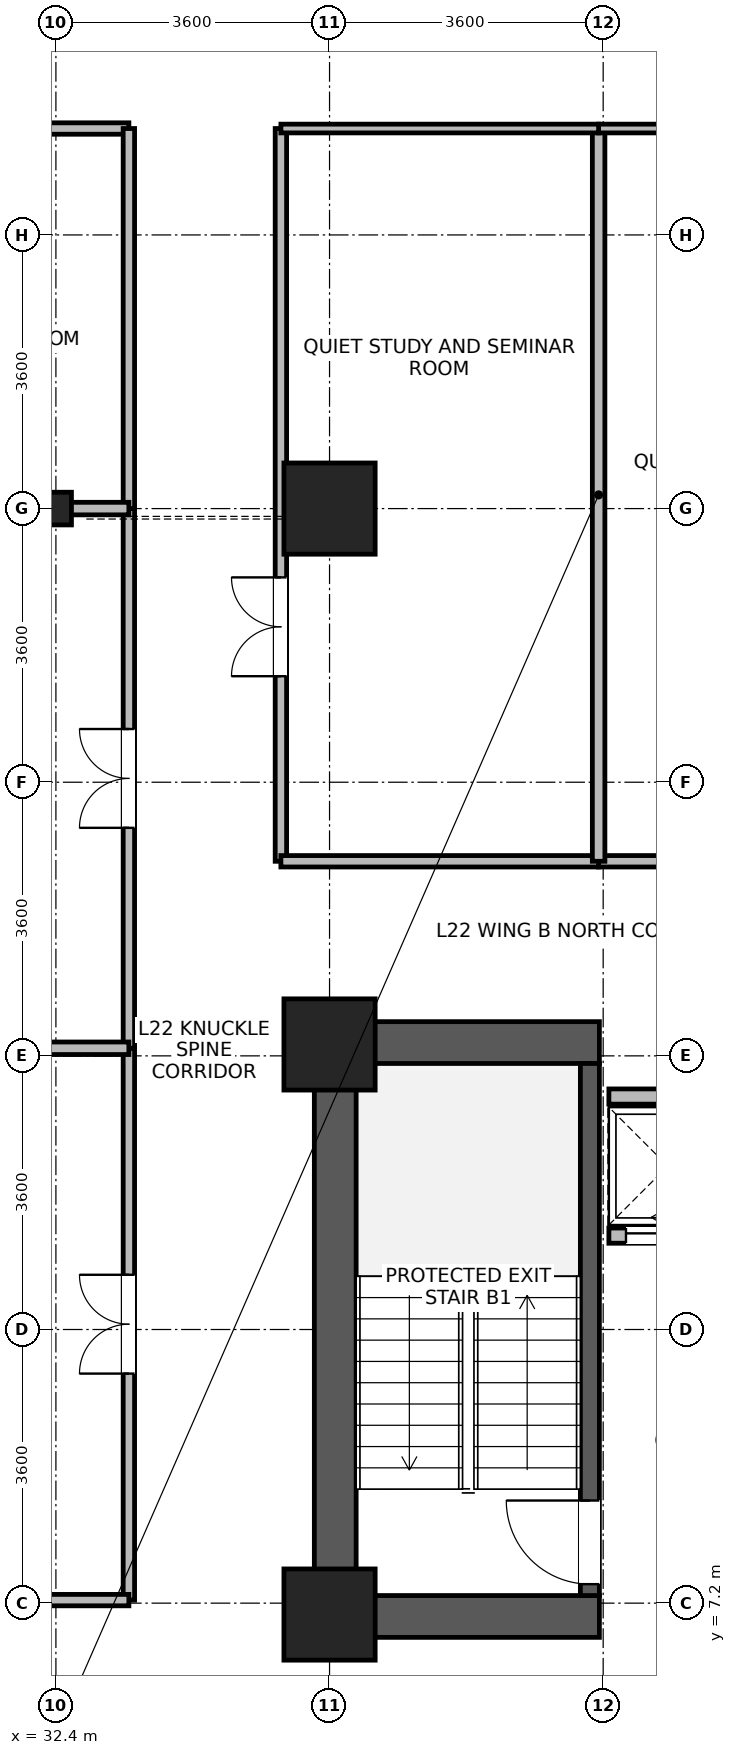
"""IFC4 building model, lengths in metres.
Left out: names, types, materials, properties, quantities, classifications, styles, units other than length and angle.
Written with IfcOpenShell. Run it as: python <this file> out.ifc"""

import sys

from ifc_helpers import new_model, si_unit, direction, frame, frame_2d, origin, origin_2d, place, context, subcontext, project, spatial, rectangle, i_section, extrude, source, transform, mapped, element, fill, save


model = new_model("IFC4")
c1 = context("Model", 3, precision=1e-05, world=origin(), true_north=direction((0.0, 1.0)))
c2 = subcontext(c1, "Body", "Model", "MODEL_VIEW")
j1 = project(units=[si_unit("LENGTHUNIT", "METRE"), si_unit("PLANEANGLEUNIT", "RADIAN")], contexts=[c1])
p1 = place(None, origin())
s1 = spatial("IfcSite", under=j1, at=p1, CompositionType="ELEMENT")
p2 = place(p1, origin())
s2 = spatial("IfcBuilding", under=s1, at=p2, CompositionType="ELEMENT")
p3 = place(p2, frame((0.0, 0.0, 89.7)))
s3 = spatial("IfcBuildingStorey", under=s2, at=p3, CompositionType="ELEMENT", Elevation=89.7)
p4 = place(p3, frame((36.075, 6.75, 0.0), z_axis=(0.0, 0.0, 1.0), x_axis=(0.0, 1.0, 0.0)))
e1 = element("IfcWall", 1, at=p4, inside=s3, PredefinedType="SHEAR", context=c2, shape_type="SweptSolid", body=[
    extrude(rectangle(XDim=8.1, YDim=0.55, at=frame_2d((4.05, 0.0))), origin(), (0.0, 0.0, 1.0), 3.45),
])
for number, where, z_axis, x_axis in (
    (2, (36.35, 7.025, 0.0), (0.0, 0.0, 1.0), (1.0, 0.0, 0.0)),
    (3, (36.35, 14.575, 0.0), (0.0, 0.0, 1.0), (1.0, 0.0, 0.0)),
):
    element("IfcWall", number, at=place(p3, frame(where, z_axis=z_axis, x_axis=x_axis)), inside=s3, PredefinedType="SHEAR", context=c2, shape_type="SweptSolid", body=[
        extrude(rectangle(XDim=3.2, YDim=0.55, at=frame_2d((1.6, 0.0))), origin(), (0.0, 0.0, 1.0), 3.45),
    ])
p5 = place(p3, frame((39.425, 7.3, 0.0), z_axis=(0.0, 0.0, 1.0), x_axis=(0.0, 1.0, 0.0)))
e4 = element("IfcWall", 4, at=p5, inside=s3, PredefinedType="SHEAR", context=c2, shape_type="SweptSolid", body=[
    extrude(rectangle(XDim=7.0, YDim=0.25, at=frame_2d((3.5, 0.0))), origin(), (0.0, 0.0, 1.0), 3.45),
])
p6 = place(p5, frame((0.15, 0.0, 0.0)))
e5 = element("IfcOpeningElement", 5, at=p6, cuts=e4, PredefinedType="OPENING", context=c2, shape_type="SweptSolid", body=[
    extrude(rectangle(XDim=1.1, YDim=2.08, at=frame_2d((0.55, 1.04))), frame((0.0, 0.135, 0.0), z_axis=(0.0, -1.0, 0.0), x_axis=(1.0, 0.0, 0.0)), (0.0, 0.0, 1.0), 0.27),
])
m1 = source(origin(), c2, "Body", "SweptSolid", [
    extrude(rectangle(XDim=1.2, YDim=1.2, at=origin_2d()), origin(), (0.0, 0.0, 1.0), 3.7),
])
for number, where, z_axis, x_axis in (
    (6, (36.0, 21.6, 0.0), (0.0, 0.0, 1.0), (1.0, 0.0, 0.0)),
    (7, (36.0, 7.05, 0.0), (0.0, 0.0, 1.0), (1.0, 0.0, 0.0)),
    (8, (36.0, 14.55, 0.0), (0.0, 0.0, 1.0), (1.0, 0.0, 0.0)),
):
    element("IfcColumn", number, at=place(p3, frame(where, z_axis=z_axis, x_axis=x_axis)), inside=s3, PredefinedType="COLUMN", context=c2, shape_type="MappedRepresentation", body=[
        mapped(m1, transform((0.0, 0.0, 0.0), x_axis=(1.0, 0.0, 0.0), y_axis=(0.0, 1.0, 0.0), z_axis=(0.0, 0.0, 1.0), scale=1.0)),
    ])
m2 = source(origin(), c2, "Body", "SweptSolid", [
    extrude(i_section(OverallWidth=0.409, OverallDepth=0.43, WebThickness=0.024, FlangeThickness=0.033, FilletRadius=0.015, at=origin_2d()), origin(), (0.0, 0.0, 1.0), 3.7),
])
p7 = place(p3, frame((32.4, 21.6, 0.0), z_axis=(0.0, 0.0, 1.0), x_axis=(1.0, 0.0, 0.0)))
e9 = element("IfcColumn", 9, at=p7, inside=s3, PredefinedType="COLUMN", context=c2, shape_type="MappedRepresentation", body=[
    mapped(m2, transform((0.0, 0.0, 0.0), x_axis=(1.0, 0.0, 0.0), y_axis=(0.0, 1.0, 0.0), z_axis=(0.0, 0.0, 1.0), scale=1.0)),
])
p8 = place(p3, frame((39.675, 12.035, 0.0), z_axis=(0.0, 0.0, 1.0), x_axis=(1.0, 0.0, 0.0)))
e10 = element("IfcWall", 10, at=p8, inside=s3, PredefinedType="PARTITIONING", context=c2, shape_type="SweptSolid", body=[
    extrude(rectangle(XDim=1.55, YDim=0.2, at=frame_2d((0.775, 0.0))), origin(), (0.0, 0.0, 1.0), 3.43),
])
p9 = place(p8, frame((0.225, 0.0, 0.0)))
e11 = element("IfcOpeningElement", 11, at=p9, cuts=e10, PredefinedType="OPENING", context=c2, shape_type="SweptSolid", body=[
    extrude(rectangle(XDim=1.1, YDim=2.12, at=frame_2d((0.55, 1.06))), frame((0.0, 0.11, 0.0), z_axis=(0.0, -1.0, 0.0), x_axis=(1.0, 0.0, 0.0)), (0.0, 0.0, 1.0), 0.22),
])
p10 = place(p3, frame((39.675, 13.865, 0.0), z_axis=(0.0, 0.0, 1.0), x_axis=(1.0, 0.0, 0.0)))
e12 = element("IfcWall", 12, at=p10, inside=s3, PredefinedType="PARTITIONING", context=c2, shape_type="SweptSolid", body=[
    extrude(rectangle(XDim=1.55, YDim=0.2, at=frame_2d((0.775, 0.0))), origin(), (0.0, 0.0, 1.0), 3.43),
])
p11 = place(p3, frame((35.36, 16.96, 0.0), z_axis=(0.0, 0.0, 1.0), x_axis=(0.0, 1.0, 0.0)))
e13 = element("IfcWall", 13, at=p11, inside=s3, PredefinedType="PARTITIONING", context=c2, shape_type="SweptSolid", body=[
    extrude(rectangle(XDim=9.64, YDim=0.15, at=frame_2d((4.82, 0.0))), origin(), (0.0, 0.0, 1.0), 3.43),
])
p12 = place(p11, frame((2.435, 0.0, 0.0)))
e14 = element("IfcOpeningElement", 14, at=p12, cuts=e13, PredefinedType="OPENING", context=c2, shape_type="SweptSolid", body=[
    extrude(rectangle(XDim=1.3, YDim=2.12, at=frame_2d((0.65, 1.06))), frame((0.0, 0.085, 0.0), z_axis=(0.0, -1.0, 0.0), x_axis=(1.0, 0.0, 0.0)), (0.0, 0.0, 1.0), 0.17),
])
p13 = place(p3, frame((33.36, 7.24, 0.0), z_axis=(0.0, 0.0, 1.0), x_axis=(0.0, 1.0, 0.0)))
e15 = element("IfcWall", 15, at=p13, inside=s3, PredefinedType="PARTITIONING", context=c2, shape_type="SweptSolid", body=[
    extrude(rectangle(XDim=7.26, YDim=0.15, at=frame_2d((3.63, 0.0))), origin(), (0.0, 0.0, 1.0), 3.43),
])
p14 = place(p13, frame((2.98, 0.0, 0.0)))
e16 = element("IfcOpeningElement", 16, at=p14, cuts=e15, PredefinedType="OPENING", context=c2, shape_type="SweptSolid", body=[
    extrude(rectangle(XDim=1.3, YDim=2.12, at=frame_2d((0.65, 1.06))), frame((0.0, 0.085, 0.0), z_axis=(0.0, -1.0, 0.0), x_axis=(1.0, 0.0, 0.0)), (0.0, 0.0, 1.0), 0.17),
])
p15 = place(p3, frame((33.36, 14.5, 0.0), z_axis=(0.0, 0.0, 1.0), x_axis=(0.0, 1.0, 0.0)))
e17 = element("IfcWall", 17, at=p15, inside=s3, PredefinedType="PARTITIONING", context=c2, shape_type="SweptSolid", body=[
    extrude(rectangle(XDim=7.1, YDim=0.15, at=frame_2d((3.55, 0.0))), origin(), (0.0, 0.0, 1.0), 3.43),
])
p16 = place(p15, frame((2.9, 0.0, 0.0)))
e18 = element("IfcOpeningElement", 18, at=p16, cuts=e17, PredefinedType="OPENING", context=c2, shape_type="SweptSolid", body=[
    extrude(rectangle(XDim=1.3, YDim=2.12, at=frame_2d((0.65, 1.06))), frame((0.0, 0.085, 0.0), z_axis=(0.0, -1.0, 0.0), x_axis=(1.0, 0.0, 0.0)), (0.0, 0.0, 1.0), 0.17),
])
p17 = place(p3, frame((27.62, 26.6, 0.0), z_axis=(0.0, 0.0, 1.0), x_axis=(1.0, 0.0, 0.0)))
e19 = element("IfcWall", 19, at=p17, inside=s3, PredefinedType="PARTITIONING", context=c2, shape_type="SweptSolid", body=[
    extrude(rectangle(XDim=5.74, YDim=0.15, at=frame_2d((2.87, 0.0))), origin(), (0.0, 0.0, 1.0), 3.43),
])
p18 = place(p17, frame((2.22, 0.0, 0.0)))
e20 = element("IfcOpeningElement", 20, at=p18, cuts=e19, PredefinedType="OPENING", context=c2, shape_type="SweptSolid", body=[
    extrude(rectangle(XDim=1.3, YDim=2.12, at=frame_2d((0.65, 1.06))), frame((0.0, 0.085, 0.0), z_axis=(0.0, -1.0, 0.0), x_axis=(1.0, 0.0, 0.0)), (0.0, 0.0, 1.0), 0.17),
])
p19 = place(p3, frame((33.36, 21.6, 0.0), z_axis=(0.0, 0.0, 1.0), x_axis=(0.0, 1.0, 0.0)))
e21 = element("IfcWall", 21, at=p19, inside=s3, PredefinedType="PARTITIONING", context=c2, shape_type="SweptSolid", body=[
    extrude(rectangle(XDim=5.0, YDim=0.15, at=frame_2d((2.5, 0.0))), origin(), (0.0, 0.0, 1.0), 3.43),
])
p20 = place(p3, frame((39.54, 16.96, 0.0), z_axis=(0.0, 0.0, 1.0), x_axis=(1.0, 0.0, 0.0)))
e22 = element("IfcWall", 22, at=p20, inside=s3, PredefinedType="PARTITIONING", context=c2, shape_type="SweptSolid", body=[
    extrude(rectangle(XDim=4.5, YDim=0.15, at=frame_2d((2.25, 0.0))), origin(), (0.0, 0.0, 1.0), 3.43),
])
p21 = place(p20, frame((1.6, 0.0, 0.0)))
e23 = element("IfcOpeningElement", 23, at=p21, cuts=e22, PredefinedType="OPENING", context=c2, shape_type="SweptSolid", body=[
    extrude(rectangle(XDim=1.3, YDim=2.12, at=frame_2d((0.65, 1.06))), frame((0.0, 0.085, 0.0), z_axis=(0.0, -1.0, 0.0), x_axis=(1.0, 0.0, 0.0)), (0.0, 0.0, 1.0), 0.17),
])
p22 = place(p3, frame((35.36, 16.96, 0.0), z_axis=(0.0, 0.0, 1.0), x_axis=(1.0, 0.0, 0.0)))
e24 = element("IfcWall", 24, at=p22, inside=s3, PredefinedType="PARTITIONING", context=c2, shape_type="SweptSolid", body=[
    extrude(rectangle(XDim=4.18, YDim=0.15, at=frame_2d((2.09, 0.0))), origin(), (0.0, 0.0, 1.0), 3.43),
])
p23 = place(p3, frame((32.032, 7.24, 0.0), z_axis=(0.0, 0.0, 1.0), x_axis=(1.0, 0.0, 0.0)))
e25 = element("IfcWall", 25, at=p23, inside=s3, PredefinedType="PARTITIONING", context=c2, shape_type="SweptSolid", body=[
    extrude(rectangle(XDim=1.328, YDim=0.15, at=frame_2d((0.664, 0.0))), origin(), (0.0, 0.0, 1.0), 3.43),
])
p24 = place(p3, frame((39.54, 16.96, 0.0), z_axis=(0.0, 0.0, 1.0), x_axis=(0.0, 1.0, 0.0)))
e26 = element("IfcWall", 26, at=p24, inside=s3, PredefinedType="PARTITIONING", context=c2, shape_type="SweptSolid", body=[
    extrude(rectangle(XDim=9.64, YDim=0.165, at=frame_2d((4.82, 0.0))), origin(), (0.0, 0.0, 1.0), 3.43),
])
p25 = place(p3, frame((39.54, 26.6, 0.0), z_axis=(0.0, 0.0, 1.0), x_axis=(1.0, 0.0, 0.0)))
e27 = element("IfcWall", 27, at=p25, inside=s3, PredefinedType="PARTITIONING", context=c2, shape_type="SweptSolid", body=[
    extrude(rectangle(XDim=4.5, YDim=0.115, at=frame_2d((2.25, 0.0))), origin(), (0.0, 0.0, 1.0), 3.43),
])
p26 = place(p3, frame((35.36, 26.6, 0.0), z_axis=(0.0, 0.0, 1.0), x_axis=(1.0, 0.0, 0.0)))
e28 = element("IfcWall", 28, at=p26, inside=s3, PredefinedType="PARTITIONING", context=c2, shape_type="SweptSolid", body=[
    extrude(rectangle(XDim=4.18, YDim=0.115, at=frame_2d((2.09, 0.0))), origin(), (0.0, 0.0, 1.0), 3.43),
])
p27 = place(p3, frame((32.032, 14.5, 0.0), z_axis=(0.0, 0.0, 1.0), x_axis=(1.0, 0.0, 0.0)))
e29 = element("IfcWall", 29, at=p27, inside=s3, PredefinedType="PARTITIONING", context=c2, shape_type="SweptSolid", body=[
    extrude(rectangle(XDim=1.328, YDim=0.165, at=frame_2d((0.664, 0.0))), origin(), (0.0, 0.0, 1.0), 3.43),
])
p28 = place(p3, frame((32.032, 21.6, 0.0), z_axis=(0.0, 0.0, 1.0), x_axis=(1.0, 0.0, 0.0)))
e30 = element("IfcWall", 30, at=p28, inside=s3, PredefinedType="PARTITIONING", context=c2, shape_type="SweptSolid", body=[
    extrude(rectangle(XDim=1.328, YDim=0.165, at=frame_2d((0.664, 0.0))), origin(), (0.0, 0.0, 1.0), 2.93),
])
p29 = place(p6, origin())
e31 = element("IfcDoor", 31, at=p29, inside=s3, OperationType="SINGLE_SWING_RIGHT", PredefinedType="DOOR", context=c2, shape_type="SweptSolid", body=[
    extrude(rectangle(XDim=1.1, YDim=2.08, at=frame_2d((0.55, 1.04))), frame((0.0, 0.025, 0.0), z_axis=(0.0, -1.0, 0.0), x_axis=(1.0, 0.0, 0.0)), (0.0, 0.0, 1.0), 0.05),
])
fill(e5, e31)
p30 = place(p9, origin())
e32 = element("IfcDoor", 32, at=p30, inside=s3, OperationType="SLIDING_TO_LEFT", PredefinedType="DOOR", context=c2, shape_type="SweptSolid", body=[
    extrude(rectangle(XDim=1.1, YDim=2.12, at=frame_2d((0.55, 1.06))), frame((0.0, 0.025, 0.0), z_axis=(0.0, -1.0, 0.0), x_axis=(1.0, 0.0, 0.0)), (0.0, 0.0, 1.0), 0.05),
])
fill(e11, e32)
p31 = place(p12, origin())
e33 = element("IfcDoor", 33, at=p31, inside=s3, OperationType="DOUBLE_DOOR_SINGLE_SWING", PredefinedType="DOOR", context=c2, shape_type="SweptSolid", body=[
    extrude(rectangle(XDim=1.3, YDim=2.12, at=frame_2d((0.65, 1.06))), frame((0.0, 0.025, 0.0), z_axis=(0.0, -1.0, 0.0), x_axis=(1.0, 0.0, 0.0)), (0.0, 0.0, 1.0), 0.05),
])
fill(e14, e33)
p32 = place(p14, origin())
e34 = element("IfcDoor", 34, at=p32, inside=s3, OperationType="DOUBLE_DOOR_SINGLE_SWING", PredefinedType="DOOR", context=c2, shape_type="SweptSolid", body=[
    extrude(rectangle(XDim=1.3, YDim=2.12, at=frame_2d((0.65, 1.06))), frame((0.0, 0.025, 0.0), z_axis=(0.0, -1.0, 0.0), x_axis=(1.0, 0.0, 0.0)), (0.0, 0.0, 1.0), 0.05),
])
fill(e16, e34)
p33 = place(p16, origin())
e35 = element("IfcDoor", 35, at=p33, inside=s3, OperationType="DOUBLE_DOOR_SINGLE_SWING", PredefinedType="DOOR", context=c2, shape_type="SweptSolid", body=[
    extrude(rectangle(XDim=1.3, YDim=2.12, at=frame_2d((0.65, 1.06))), frame((0.0, 0.025, 0.0), z_axis=(0.0, -1.0, 0.0), x_axis=(1.0, 0.0, 0.0)), (0.0, 0.0, 1.0), 0.05),
])
fill(e18, e35)
save(model, sys.argv[1])
